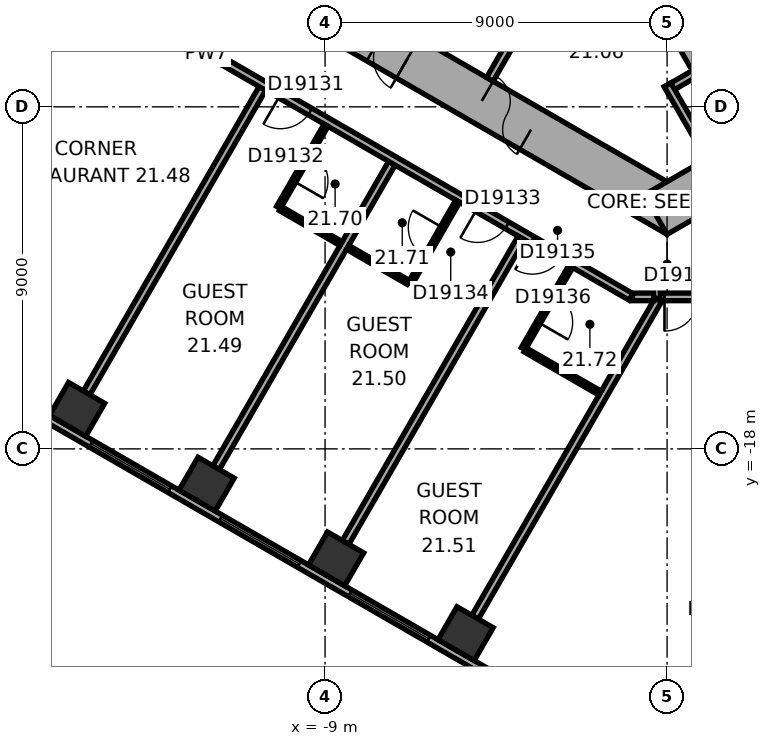
"""IFC4 building model, lengths in metres.
Left out: names, types, materials, properties, quantities, classifications, styles, units other than length and angle.
Written with IfcOpenShell. Run it as: python <this file> out.ifc"""

import sys

from ifc_helpers import new_model, si_unit, direction, frame, frame_2d, origin, origin_2d, place, context, subcontext, project, spatial, rectangle, extrude, element, fill, save


model = new_model("IFC4")
c1 = context("Model", 3, precision=1e-05, world=origin(), true_north=direction((0.0, 1.0)))
c2 = subcontext(c1, "Body", "Model", "MODEL_VIEW")
j1 = project(units=[si_unit("LENGTHUNIT", "METRE"), si_unit("PLANEANGLEUNIT", "RADIAN")], contexts=[c1])
p1 = place(None, origin())
s1 = spatial("IfcSite", under=j1, at=p1, CompositionType="ELEMENT")
p2 = place(p1, origin())
s2 = spatial("IfcBuilding", under=s1, at=p2, CompositionType="ELEMENT")
p3 = place(p2, frame((0.0, 0.0, 93.5)))
s3 = spatial("IfcBuildingStorey", under=s2, at=p3, CompositionType="ELEMENT", Elevation=93.5)
for number, where, z_axis, x_axis in (
    (1, (-15.524, -16.96, 0.0), (0.0, 0.0, 1.0), (0.866, -0.5, 0.0)),
    (2, (-12.117, -18.927, 0.0), (0.0, 0.0, 1.0), (0.866, -0.5, 0.0)),
    (3, (-8.71, -20.895, 0.0), (0.0, 0.0, 1.0), (0.866, -0.5, 0.0)),
    (4, (-5.302, -22.862, 0.0), (0.0, 0.0, 1.0), (0.866, -0.5, 0.0)),
):
    element("IfcColumn", number, at=place(p3, frame(where, z_axis=z_axis, x_axis=x_axis)), inside=s3, PredefinedType="COLUMN", context=c2, shape_type="SweptSolid", body=[
        extrude(rectangle(XDim=1.1, YDim=1.0, at=origin_2d()), origin(), (0.0, 0.0, 1.0), 3.3),
    ])
p4 = place(p3, frame((-10.4, -5.658, 0.0), z_axis=(0.0, 0.0, 1.0), x_axis=(0.866021384402, -0.500006961711, 0.0)))
e5 = element("IfcWall", 5, at=p4, inside=s3, PredefinedType="SHEAR", context=c2, shape_type="SweptSolid", body=[
    extrude(rectangle(XDim=12.355, YDim=1.2, at=frame_2d((6.178, 0.0))), origin(), (0.0, 0.0, 1.0), 3.3),
])
p5 = place(p4, frame((6.378, 0.0, 0.0)))
e6 = element("IfcOpeningElement", 6, at=p5, cuts=e5, PredefinedType="OPENING", context=c2, shape_type="SweptSolid", body=[
    extrude(rectangle(XDim=1.5, YDim=2.1, at=frame_2d((0.75, 1.05))), frame((0.0, 0.61, 0.0), z_axis=(0.0, -1.0, 0.0), x_axis=(1.0, 0.0, 0.0)), (0.0, 0.0, 1.0), 1.22),
])
p6 = place(p4, frame((3.228, 0.0, 0.0)))
e7 = element("IfcOpeningElement", 7, at=p6, cuts=e5, PredefinedType="OPENING", context=c2, shape_type="SweptSolid", body=[
    extrude(rectangle(XDim=0.9, YDim=2.1, at=frame_2d((0.45, 1.05))), frame((0.0, 0.61, 0.0), z_axis=(0.0, -1.0, 0.0), x_axis=(1.0, 0.0, 0.0)), (0.0, 0.0, 1.0), 1.22),
])
p7 = place(p3, frame((-0.3, -11.836, 0.0), z_axis=(0.0, 0.0, 1.0), x_axis=(0.866021384402, 0.500006961711, 0.0)))
e8 = element("IfcWall", 8, at=p7, inside=s3, PredefinedType="SHEAR", context=c2, shape_type="SweptSolid", body=[
    extrude(rectangle(XDim=12.355, YDim=1.2, at=frame_2d((6.178, 0.0))), origin(), (0.0, 0.0, 1.0), 3.3),
])
p8 = place(p7, frame((2.828, 0.0, 0.0)))
e9 = element("IfcOpeningElement", 9, at=p8, cuts=e8, PredefinedType="OPENING", context=c2, shape_type="SweptSolid", body=[
    extrude(rectangle(XDim=0.9, YDim=2.1, at=frame_2d((0.45, 1.05))), frame((0.0, 0.61, 0.0), z_axis=(0.0, -1.0, 0.0), x_axis=(1.0, 0.0, 0.0)), (0.0, 0.0, 1.0), 1.22),
])
p9 = place(p7, frame((5.428, 0.0, 0.0)))
e10 = element("IfcOpeningElement", 10, at=p9, cuts=e8, PredefinedType="OPENING", context=c2, shape_type="SweptSolid", body=[
    extrude(rectangle(XDim=0.9, YDim=2.1, at=frame_2d((0.45, 1.05))), frame((0.0, 0.61, 0.0), z_axis=(0.0, -1.0, 0.0), x_axis=(1.0, 0.0, 0.0)), (0.0, 0.0, 1.0), 1.22),
])
p10 = place(p7, frame((7.928, 0.0, 0.0)))
e11 = element("IfcOpeningElement", 11, at=p10, cuts=e8, PredefinedType="OPENING", context=c2, shape_type="SweptSolid", body=[
    extrude(rectangle(XDim=1.1, YDim=2.1, at=frame_2d((0.55, 1.05))), frame((0.0, 0.61, 0.0), z_axis=(0.0, -1.0, 0.0), x_axis=(1.0, 0.0, 0.0)), (0.0, 0.0, 1.0), 1.22),
])
p11 = place(p3, frame((-19.914, -15.119, 0.0), z_axis=(0.0, 0.0, 1.0), x_axis=(0.866025418898, -0.499999973822, 0.0)))
e12 = element("IfcWall", 12, at=p11, inside=s3, PredefinedType="STANDARD", context=c2, shape_type="SweptSolid", body=[
    extrude(rectangle(XDim=21.246, YDim=0.2, at=frame_2d((10.623, 0.0))), origin(), (0.0, 0.0, 1.0), 3.3),
])
p12 = place(p11, frame((1.555, 0.0, 0.8)))
e13 = element("IfcOpeningElement", 13, at=p12, cuts=e12, PredefinedType="OPENING", context=c2, shape_type="SweptSolid", body=[
    extrude(rectangle(XDim=2.4, YDim=1.7, at=frame_2d((1.2, 0.85))), frame((0.0, 0.11, 0.0), z_axis=(0.0, -1.0, 0.0), x_axis=(1.0, 0.0, 0.0)), (0.0, 0.0, 1.0), 0.22),
])
p13 = place(p11, frame((5.489, 0.0, 0.8)))
e14 = element("IfcOpeningElement", 14, at=p13, cuts=e12, PredefinedType="OPENING", context=c2, shape_type="SweptSolid", body=[
    extrude(rectangle(XDim=2.4, YDim=1.7, at=frame_2d((1.2, 0.85))), frame((0.0, 0.11, 0.0), z_axis=(0.0, -1.0, 0.0), x_axis=(1.0, 0.0, 0.0)), (0.0, 0.0, 1.0), 0.22),
])
p14 = place(p11, frame((9.424, 0.0, 0.8)))
e15 = element("IfcOpeningElement", 15, at=p14, cuts=e12, PredefinedType="OPENING", context=c2, shape_type="SweptSolid", body=[
    extrude(rectangle(XDim=2.4, YDim=1.7, at=frame_2d((1.2, 0.85))), frame((0.0, 0.11, 0.0), z_axis=(0.0, -1.0, 0.0), x_axis=(1.0, 0.0, 0.0)), (0.0, 0.0, 1.0), 0.22),
])
p15 = place(p11, frame((13.358, 0.0, 0.8)))
e16 = element("IfcOpeningElement", 16, at=p15, cuts=e12, PredefinedType="OPENING", context=c2, shape_type="SweptSolid", body=[
    extrude(rectangle(XDim=2.4, YDim=1.7, at=frame_2d((1.2, 0.85))), frame((0.0, 0.11, 0.0), z_axis=(0.0, -1.0, 0.0), x_axis=(1.0, 0.0, 0.0)), (0.0, 0.0, 1.0), 0.22),
])
p16 = place(p11, frame((17.293, 0.0, 0.8)))
e17 = element("IfcOpeningElement", 17, at=p16, cuts=e12, PredefinedType="OPENING", context=c2, shape_type="SweptSolid", body=[
    extrude(rectangle(XDim=2.4, YDim=1.7, at=frame_2d((1.2, 0.85))), frame((0.0, 0.11, 0.0), z_axis=(0.0, -1.0, 0.0), x_axis=(1.0, 0.0, 0.0)), (0.0, 0.0, 1.0), 0.22),
])
p17 = place(p3, frame((-3.563, -6.372, 0.0), z_axis=(0.0, 0.0, 1.0), x_axis=(-0.499994660107, -0.866028486751, 0.0)))
e18 = element("IfcWall", 18, at=p17, inside=s3, PredefinedType="PARTITIONING", context=c2, shape_type="SweptSolid", body=[
    extrude(rectangle(XDim=2.2, YDim=0.2, at=frame_2d((1.1, 0.0))), origin(), (0.0, 0.0, 1.0), 3.05),
])
p18 = place(p3, frame((-0.024, -8.559, 0.0), z_axis=(0.0, 0.0, 1.0), x_axis=(0.866026010844, 0.49999894854, 0.0)))
e19 = element("IfcWall", 19, at=p18, inside=s3, PredefinedType="PARTITIONING", context=c2, shape_type="SweptSolid", body=[
    extrude(rectangle(XDim=8.0, YDim=0.2, at=frame_2d((4.0, 0.0))), origin(), (0.0, 0.0, 1.0), 3.05),
])
p19 = place(p3, frame((0.013, -8.422, 0.0), z_axis=(0.0, 0.0, 1.0), x_axis=(0.500077893725, -0.86598042715, 0.0)))
e20 = element("IfcWall", 20, at=p19, inside=s3, PredefinedType="PARTITIONING", context=c2, shape_type="SweptSolid", body=[
    extrude(rectangle(XDim=2.2, YDim=0.2, at=frame_2d((1.1, 0.0))), origin(), (0.0, 0.0, 1.0), 3.05),
])
p20 = place(p3, frame((-1.558, -3.902, 0.0), z_axis=(0.0, 0.0, 1.0), x_axis=(0.499977259774, -0.866038532462, 0.0)))
e21 = element("IfcWall", 21, at=p20, inside=s3, PredefinedType="SHEAR", context=c2, shape_type="SweptSolid", body=[
    extrude(rectangle(XDim=4.7, YDim=0.3, at=frame_2d((2.35, 0.0))), origin(), (0.0, 0.0, 1.0), 3.05),
])
p21 = place(p20, frame((0.8, 0.0, 0.0)))
e22 = element("IfcOpeningElement", 22, at=p21, cuts=e21, PredefinedType="OPENING", context=c2, shape_type="SweptSolid", body=[
    extrude(rectangle(XDim=1.2, YDim=2.1, at=frame_2d((0.6, 1.05))), frame((0.0, 0.16, 0.0), z_axis=(0.0, -1.0, 0.0), x_axis=(1.0, 0.0, 0.0)), (0.0, 0.0, 1.0), 0.32),
])
p22 = place(p3, frame((-15.274, -16.527, 0.0), z_axis=(0.0, 0.0, 1.0), x_axis=(0.49998823431, 0.866032196602, 0.0)))
e23 = element("IfcWall", 23, at=p22, inside=s3, PredefinedType="PARTITIONING", context=c2, shape_type="SweptSolid", body=[
    extrude(rectangle(XDim=9.25, YDim=0.2, at=frame_2d((4.625, 0.0))), origin(), (0.0, 0.0, 1.0), 3.05),
])
p23 = place(p3, frame((-12.6, -6.177, 0.0), z_axis=(0.0, 0.0, 1.0), x_axis=(0.500063520245, -0.865988727248, 0.0)))
e24 = element("IfcWall", 24, at=p23, inside=s3, PredefinedType="PARTITIONING", context=c2, shape_type="SweptSolid", body=[
    extrude(rectangle(XDim=1.9, YDim=0.2, at=frame_2d((0.95, 0.0))), origin(), (0.0, 0.0, 1.0), 3.05),
])
p24 = place(p23, frame((0.45, 0.0, 0.0)))
e25 = element("IfcOpeningElement", 25, at=p24, cuts=e24, PredefinedType="OPENING", context=c2, shape_type="SweptSolid", body=[
    extrude(rectangle(XDim=1.0, YDim=2.1, at=frame_2d((0.5, 1.05))), frame((0.0, 0.11, 0.0), z_axis=(0.0, -1.0, 0.0), x_axis=(1.0, 0.0, 0.0)), (0.0, 0.0, 1.0), 0.22),
])
p25 = place(p3, frame((-11.867, -18.494, 0.0), z_axis=(0.0, 0.0, 1.0), x_axis=(0.499999662836, 0.866025598446, 0.0)))
e26 = element("IfcWall", 26, at=p25, inside=s3, PredefinedType="PARTITIONING", context=c2, shape_type="SweptSolid", body=[
    extrude(rectangle(XDim=9.25, YDim=0.2, at=frame_2d((4.625, 0.0))), origin(), (0.0, 0.0, 1.0), 2.6),
])
p26 = place(p3, frame((-11.615, -7.843, 0.0), z_axis=(0.0, 0.0, 1.0), x_axis=(0.866026466995, -0.499998158461, 0.0)))
e27 = element("IfcWall", 27, at=p26, inside=s3, PredefinedType="PARTITIONING", context=c2, shape_type="SweptSolid", body=[
    extrude(rectangle(XDim=12.315, YDim=0.2, at=frame_2d((6.158, 0.0))), origin(), (0.0, 0.0, 1.0), 3.05),
])
p27 = place(p26, frame((1.665, 0.0, 0.0)))
e28 = element("IfcOpeningElement", 28, at=p27, cuts=e27, PredefinedType="OPENING", context=c2, shape_type="SweptSolid", body=[
    extrude(rectangle(XDim=0.9, YDim=2.1, at=frame_2d((0.45, 1.05))), frame((0.0, 0.11, 0.0), z_axis=(0.0, -1.0, 0.0), x_axis=(1.0, 0.0, 0.0)), (0.0, 0.0, 1.0), 0.22),
])
p28 = place(p26, frame((7.65, 0.0, 0.0)))
e29 = element("IfcOpeningElement", 29, at=p28, cuts=e27, PredefinedType="OPENING", context=c2, shape_type="SweptSolid", body=[
    extrude(rectangle(XDim=0.9, YDim=2.1, at=frame_2d((0.45, 1.05))), frame((0.0, 0.11, 0.0), z_axis=(0.0, -1.0, 0.0), x_axis=(1.0, 0.0, 0.0)), (0.0, 0.0, 1.0), 0.22),
])
p29 = place(p26, frame((9.317, 0.0, 0.0)))
e30 = element("IfcOpeningElement", 30, at=p29, cuts=e27, PredefinedType="OPENING", context=c2, shape_type="SweptSolid", body=[
    extrude(rectangle(XDim=0.9, YDim=2.1, at=frame_2d((0.45, 1.05))), frame((0.0, 0.11, 0.0), z_axis=(0.0, -1.0, 0.0), x_axis=(1.0, 0.0, 0.0)), (0.0, 0.0, 1.0), 0.22),
])
p30 = place(p3, frame((-10.224, -11.648, 0.0), z_axis=(0.0, 0.0, 1.0), x_axis=(0.500004234368, 0.866022959057, 0.0)))
e31 = element("IfcWall", 31, at=p30, inside=s3, PredefinedType="PARTITIONING", context=c2, shape_type="SweptSolid", body=[
    extrude(rectangle(XDim=2.5, YDim=0.12, at=frame_2d((1.25, 0.0))), origin(), (0.0, 0.0, 1.0), 3.05),
])
p31 = place(p30, frame((0.8, 0.0, 0.0)))
e32 = element("IfcOpeningElement", 32, at=p31, cuts=e31, PredefinedType="OPENING", context=c2, shape_type="SweptSolid", body=[
    extrude(rectangle(XDim=0.9, YDim=2.1, at=frame_2d((0.45, 1.05))), frame((0.0, 0.07, 0.0), z_axis=(0.0, -1.0, 0.0), x_axis=(1.0, 0.0, 0.0)), (0.0, 0.0, 1.0), 0.14),
])
p32 = place(p3, frame((-8.579, -12.598, 0.0), z_axis=(0.0, 0.0, 1.0), x_axis=(-0.866046386007, 0.499963655964, 0.0)))
e33 = element("IfcWall", 33, at=p32, inside=s3, PredefinedType="PARTITIONING", context=c2, shape_type="SweptSolid", body=[
    extrude(rectangle(XDim=1.84, YDim=0.12, at=frame_2d((0.92, 0.0))), origin(), (0.0, 0.0, 1.0), 3.05),
])
p33 = place(p3, frame((-8.46, -20.461, 0.0), z_axis=(0.0, 0.0, 1.0), x_axis=(0.499999662836, 0.866025598446, 0.0)))
e34 = element("IfcWall", 34, at=p33, inside=s3, PredefinedType="PARTITIONING", context=c2, shape_type="SweptSolid", body=[
    extrude(rectangle(XDim=9.25, YDim=0.2, at=frame_2d((4.625, 0.0))), origin(), (0.0, 0.0, 1.0), 3.05),
])
p34 = place(p3, frame((-6.812, -13.618, 0.0), z_axis=(0.0, 0.0, 1.0), x_axis=(-0.866046386007, 0.499963655964, 0.0)))
e35 = element("IfcWall", 35, at=p34, inside=s3, PredefinedType="PARTITIONING", context=c2, shape_type="SweptSolid", body=[
    extrude(rectangle(XDim=1.84, YDim=0.12, at=frame_2d((0.92, 0.0))), origin(), (0.0, 0.0, 1.0), 3.05),
])
p35 = place(p3, frame((-5.51, -11.483, 0.0), z_axis=(0.0, 0.0, 1.0), x_axis=(-0.500004234368, -0.866022959057, 0.0)))
e36 = element("IfcWall", 36, at=p35, inside=s3, PredefinedType="PARTITIONING", context=c2, shape_type="SweptSolid", body=[
    extrude(rectangle(XDim=2.5, YDim=0.12, at=frame_2d((1.25, 0.0))), origin(), (0.0, 0.0, 1.0), 3.05),
])
p36 = place(p35, frame((0.8, 0.0, 0.0)))
e37 = element("IfcOpeningElement", 37, at=p36, cuts=e36, PredefinedType="OPENING", context=c2, shape_type="SweptSolid", body=[
    extrude(rectangle(XDim=0.9, YDim=2.1, at=frame_2d((0.45, 1.05))), frame((0.0, 0.07, 0.0), z_axis=(0.0, -1.0, 0.0), x_axis=(1.0, 0.0, 0.0)), (0.0, 0.0, 1.0), 0.14),
])
p37 = place(p3, frame((-5.052, -22.429, 0.0), z_axis=(0.0, 0.0, 1.0), x_axis=(0.50000569793, 0.866022114058, 0.0)))
e38 = element("IfcWall", 38, at=p37, inside=s3, PredefinedType="PARTITIONING", context=c2, shape_type="SweptSolid", body=[
    extrude(rectangle(XDim=9.65, YDim=0.2, at=frame_2d((4.825, 0.0))), origin(), (0.0, 0.0, 1.0), 3.05),
])
p38 = place(p3, frame((-3.786, -15.366, 0.0), z_axis=(0.0, 0.0, 1.0), x_axis=(0.500004234368, 0.866022959057, 0.0)))
e39 = element("IfcWall", 39, at=p38, inside=s3, PredefinedType="PARTITIONING", context=c2, shape_type="SweptSolid", body=[
    extrude(rectangle(XDim=2.5, YDim=0.12, at=frame_2d((1.25, 0.0))), origin(), (0.0, 0.0, 1.0), 3.05),
])
p39 = place(p38, frame((0.8, 0.0, 0.0)))
e40 = element("IfcOpeningElement", 40, at=p39, cuts=e39, PredefinedType="OPENING", context=c2, shape_type="SweptSolid", body=[
    extrude(rectangle(XDim=0.9, YDim=2.1, at=frame_2d((0.45, 1.05))), frame((0.0, 0.07, 0.0), z_axis=(0.0, -1.0, 0.0), x_axis=(1.0, 0.0, 0.0)), (0.0, 0.0, 1.0), 0.14),
])
p40 = place(p3, frame((-1.764, -16.533, 0.0), z_axis=(0.0, 0.0, 1.0), x_axis=(-0.866008641419, 0.500029032144, 0.0)))
e41 = element("IfcWall", 41, at=p40, inside=s3, PredefinedType="PARTITIONING", context=c2, shape_type="SweptSolid", body=[
    extrude(rectangle(XDim=2.275, YDim=0.12, at=frame_2d((1.137, 0.0))), origin(), (0.0, 0.0, 1.0), 3.05),
])
p41 = place(p3, frame((-0.91, -14.001, 0.0), z_axis=(0.0, 0.0, 1.0), x_axis=(1.0, 0.0, 0.0)))
e42 = element("IfcWall", 42, at=p41, inside=s3, PredefinedType="PARTITIONING", context=c2, shape_type="SweptSolid", body=[
    extrude(rectangle(XDim=0.56, YDim=0.2, at=frame_2d((0.28, 0.0))), origin(), (0.0, 0.0, 1.0), 3.05),
])
p42 = place(p3, frame((-0.186, -14.001, 0.0), z_axis=(0.0, 0.0, 1.0), x_axis=(1.0, 0.0, 0.0)))
e43 = element("IfcWall", 43, at=p42, inside=s3, PredefinedType="PARTITIONING", context=c2, shape_type="SweptSolid", body=[
    extrude(rectangle(XDim=1.136, YDim=0.2, at=frame_2d((0.568, 0.0))), origin(), (0.0, 0.0, 1.0), 3.05),
])
p43 = place(p42, frame((0.118, 0.0, 0.0)))
e44 = element("IfcOpeningElement", 44, at=p43, cuts=e43, PredefinedType="OPENING", context=c2, shape_type="SweptSolid", body=[
    extrude(rectangle(XDim=0.9, YDim=2.1, at=frame_2d((0.45, 1.05))), frame((0.0, 0.11, 0.0), z_axis=(0.0, -1.0, 0.0), x_axis=(1.0, 0.0, 0.0)), (0.0, 0.0, 1.0), 0.22),
])
p44 = place(p13, origin())
e45 = element("IfcWindow", 45, at=p44, inside=s3, PartitioningType="SINGLE_PANEL", PredefinedType="WINDOW", context=c2, shape_type="SweptSolid", body=[
    extrude(rectangle(XDim=2.4, YDim=1.7, at=frame_2d((1.2, 0.85))), frame((0.0, 0.03, 0.0), z_axis=(0.0, -1.0, 0.0), x_axis=(1.0, 0.0, 0.0)), (0.0, 0.0, 1.0), 0.06),
])
fill(e14, e45)
p45 = place(p14, origin())
e46 = element("IfcWindow", 46, at=p45, inside=s3, PartitioningType="SINGLE_PANEL", PredefinedType="WINDOW", context=c2, shape_type="SweptSolid", body=[
    extrude(rectangle(XDim=2.4, YDim=1.7, at=frame_2d((1.2, 0.85))), frame((0.0, 0.03, 0.0), z_axis=(0.0, -1.0, 0.0), x_axis=(1.0, 0.0, 0.0)), (0.0, 0.0, 1.0), 0.06),
])
fill(e15, e46)
p46 = place(p15, origin())
e47 = element("IfcWindow", 47, at=p46, inside=s3, PartitioningType="SINGLE_PANEL", PredefinedType="WINDOW", context=c2, shape_type="SweptSolid", body=[
    extrude(rectangle(XDim=2.4, YDim=1.7, at=frame_2d((1.2, 0.85))), frame((0.0, 0.03, 0.0), z_axis=(0.0, -1.0, 0.0), x_axis=(1.0, 0.0, 0.0)), (0.0, 0.0, 1.0), 0.06),
])
fill(e16, e47)
p47 = place(p5, origin())
e48 = element("IfcDoor", 48, at=p47, inside=s3, OperationType="DOUBLE_DOOR_SINGLE_SWING", PredefinedType="DOOR", context=c2, shape_type="SweptSolid", body=[
    extrude(rectangle(XDim=1.5, YDim=2.1, at=frame_2d((0.75, 1.05))), frame((0.0, 0.025, 0.0), z_axis=(0.0, -1.0, 0.0), x_axis=(1.0, 0.0, 0.0)), (0.0, 0.0, 1.0), 0.05),
])
fill(e6, e48)
p48 = place(p6, origin())
e49 = element("IfcDoor", 49, at=p48, inside=s3, OperationType="SINGLE_SWING_LEFT", PredefinedType="DOOR", context=c2, shape_type="SweptSolid", body=[
    extrude(rectangle(XDim=0.9, YDim=2.1, at=frame_2d((0.45, 1.05))), frame((0.0, 0.025, 0.0), z_axis=(0.0, -1.0, 0.0), x_axis=(1.0, 0.0, 0.0)), (0.0, 0.0, 1.0), 0.05),
])
fill(e7, e49)
p49 = place(p27, origin())
e50 = element("IfcDoor", 50, at=p49, inside=s3, OperationType="SINGLE_SWING_LEFT", PredefinedType="DOOR", context=c2, shape_type="SweptSolid", body=[
    extrude(rectangle(XDim=0.9, YDim=2.1, at=frame_2d((0.45, 1.05))), frame((0.0, 0.025, 0.0), z_axis=(0.0, -1.0, 0.0), x_axis=(1.0, 0.0, 0.0)), (0.0, 0.0, 1.0), 0.05),
])
fill(e28, e50)
p50 = place(p31, origin())
e51 = element("IfcDoor", 51, at=p50, inside=s3, OperationType="SINGLE_SWING_LEFT", PredefinedType="DOOR", context=c2, shape_type="SweptSolid", body=[
    extrude(rectangle(XDim=0.9, YDim=2.1, at=frame_2d((0.45, 1.05))), frame((0.0, 0.025, 0.0), z_axis=(0.0, -1.0, 0.0), x_axis=(1.0, 0.0, 0.0)), (0.0, 0.0, 1.0), 0.05),
])
fill(e32, e51)
p51 = place(p28, origin())
e52 = element("IfcDoor", 52, at=p51, inside=s3, OperationType="SINGLE_SWING_LEFT", PredefinedType="DOOR", context=c2, shape_type="SweptSolid", body=[
    extrude(rectangle(XDim=0.9, YDim=2.1, at=frame_2d((0.45, 1.05))), frame((0.0, 0.025, 0.0), z_axis=(0.0, -1.0, 0.0), x_axis=(1.0, 0.0, 0.0)), (0.0, 0.0, 1.0), 0.05),
])
fill(e29, e52)
p52 = place(p36, origin())
e53 = element("IfcDoor", 53, at=p52, inside=s3, OperationType="SINGLE_SWING_LEFT", PredefinedType="DOOR", context=c2, shape_type="SweptSolid", body=[
    extrude(rectangle(XDim=0.9, YDim=2.1, at=frame_2d((0.45, 1.05))), frame((0.0, 0.025, 0.0), z_axis=(0.0, -1.0, 0.0), x_axis=(1.0, 0.0, 0.0)), (0.0, 0.0, 1.0), 0.05),
])
fill(e37, e53)
p53 = place(p29, origin())
e54 = element("IfcDoor", 54, at=p53, inside=s3, OperationType="SINGLE_SWING_LEFT", PredefinedType="DOOR", context=c2, shape_type="SweptSolid", body=[
    extrude(rectangle(XDim=0.9, YDim=2.1, at=frame_2d((0.45, 1.05))), frame((0.0, 0.025, 0.0), z_axis=(0.0, -1.0, 0.0), x_axis=(1.0, 0.0, 0.0)), (0.0, 0.0, 1.0), 0.05),
])
fill(e30, e54)
p54 = place(p39, origin())
e55 = element("IfcDoor", 55, at=p54, inside=s3, OperationType="SINGLE_SWING_LEFT", PredefinedType="DOOR", context=c2, shape_type="SweptSolid", body=[
    extrude(rectangle(XDim=0.9, YDim=2.1, at=frame_2d((0.45, 1.05))), frame((0.0, 0.025, 0.0), z_axis=(0.0, -1.0, 0.0), x_axis=(1.0, 0.0, 0.0)), (0.0, 0.0, 1.0), 0.05),
])
fill(e40, e55)
p55 = place(p43, origin())
e56 = element("IfcDoor", 56, at=p55, inside=s3, OperationType="SINGLE_SWING_LEFT", PredefinedType="DOOR", context=c2, shape_type="SweptSolid", body=[
    extrude(rectangle(XDim=0.9, YDim=2.1, at=frame_2d((0.45, 1.05))), frame((0.0, 0.025, 0.0), z_axis=(0.0, -1.0, 0.0), x_axis=(1.0, 0.0, 0.0)), (0.0, 0.0, 1.0), 0.05),
])
fill(e44, e56)
save(model, sys.argv[1])
